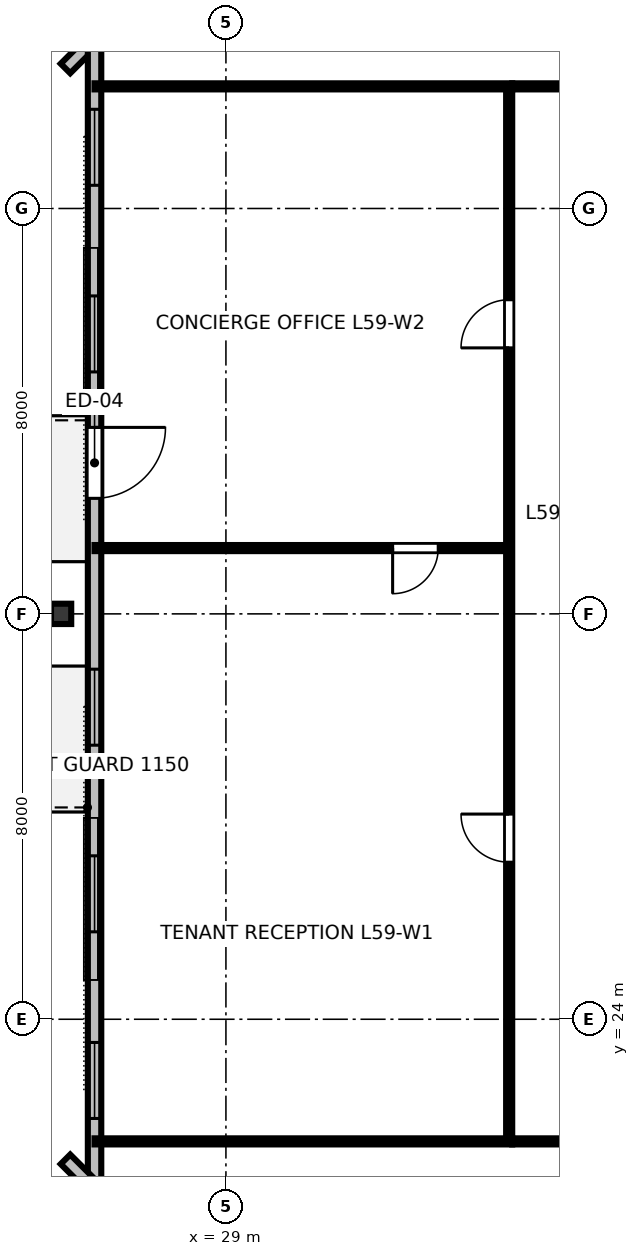
"""IFC4 building model, lengths in metres.
Left out: names, types, materials, properties, quantities, classifications, styles, units other than length and angle.
Written with IfcOpenShell. Run it as: python <this file> out.ifc"""

import sys

from ifc_helpers import new_model, si_unit, direction, frame, frame_2d, origin, origin_2d, place, context, subcontext, project, spatial, rectangle, i_section, extrude, element, fill, save


model = new_model("IFC4")
c1 = context("Model", 3, precision=1e-05, world=origin(), true_north=direction((0.0, 1.0)))
c2 = subcontext(c1, "Body", "Model", "MODEL_VIEW")
j1 = project(units=[si_unit("LENGTHUNIT", "METRE"), si_unit("PLANEANGLEUNIT", "RADIAN")], contexts=[c1])
p1 = place(None, origin())
s1 = spatial("IfcSite", under=j1, at=p1, CompositionType="ELEMENT")
p2 = place(p1, origin())
s2 = spatial("IfcBuilding", under=s1, at=p2, CompositionType="ELEMENT")
p3 = place(p2, frame((0.0, 0.0, 223.8)))
s3 = spatial("IfcBuildingStorey", under=s2, at=p3, CompositionType="ELEMENT", Elevation=223.8)
p4 = place(p3, frame((25.747, 32.0, 0.0), z_axis=(0.0, 0.0, 1.0), x_axis=(0.0, 1.0, 0.0)))
e1 = element("IfcColumn", 1, at=p4, inside=s3, PredefinedType="COLUMN", context=c2, shape_type="SweptSolid", body=[
    extrude(i_section(OverallWidth=0.401, OverallDepth=0.399, WebThickness=0.025, FlangeThickness=0.04, FilletRadius=0.025, at=origin_2d()), origin(), (0.0, 0.0, 1.0), 3.373),
])
p5 = place(p3, frame((33.191, 50.121, 0.0), z_axis=(0.0, 0.0, 1.0), x_axis=(-0.707106781187, -0.707106781187, 0.0)))
e2 = element("IfcWall", 2, at=p5, inside=s3, PredefinedType="STANDARD", context=c2, shape_type="SweptSolid", body=[
    extrude(rectangle(XDim=10.405, YDim=0.265, at=frame_2d((5.203, 0.0))), origin(), (0.0, 0.0, 1.0), 3.375),
])
p6 = place(p3, frame((26.407, 44.149, 0.0), z_axis=(0.0, 0.0, 1.0), x_axis=(0.0, -1.0, 0.0)))
e3 = element("IfcWall", 3, at=p6, inside=s3, PredefinedType="STANDARD", context=c2, shape_type="SweptSolid", body=[
    extrude(rectangle(XDim=24.298, YDim=0.265, at=frame_2d((12.149, 0.0))), origin(), (0.0, 0.0, 1.0), 3.375),
])
p7 = place(p6, frame((8.469, 0.0, 0.0)))
e4 = element("IfcOpeningElement", 4, at=p7, cuts=e3, PredefinedType="OPENING", context=c2, shape_type="SweptSolid", body=[
    extrude(rectangle(XDim=1.4, YDim=2.15, at=frame_2d((0.7, 1.075))), frame((0.0, 0.142, 0.0), z_axis=(0.0, -1.0, 0.0), x_axis=(1.0, 0.0, 0.0)), (0.0, 0.0, 1.0), 0.285),
])
p8 = place(p6, frame((2.191, 0.0, 0.85)))
e5 = element("IfcOpeningElement", 5, at=p8, cuts=e3, PredefinedType="OPENING", context=c2, shape_type="SweptSolid", body=[
    extrude(rectangle(XDim=1.5, YDim=1.85, at=frame_2d((0.75, 0.925))), frame((0.0, 0.142, 0.0), z_axis=(0.0, -1.0, 0.0), x_axis=(1.0, 0.0, 0.0)), (0.0, 0.0, 1.0), 0.285),
])
p9 = place(p6, frame((5.875, 0.0, 0.85)))
e6 = element("IfcOpeningElement", 6, at=p9, cuts=e3, PredefinedType="OPENING", context=c2, shape_type="SweptSolid", body=[
    extrude(rectangle(XDim=1.5, YDim=1.85, at=frame_2d((0.75, 0.925))), frame((0.0, 0.142, 0.0), z_axis=(0.0, -1.0, 0.0), x_axis=(1.0, 0.0, 0.0)), (0.0, 0.0, 1.0), 0.285),
])
p10 = place(p6, frame((13.24, 0.0, 0.85)))
e7 = element("IfcOpeningElement", 7, at=p10, cuts=e3, PredefinedType="OPENING", context=c2, shape_type="SweptSolid", body=[
    extrude(rectangle(XDim=1.5, YDim=1.85, at=frame_2d((0.75, 0.925))), frame((0.0, 0.142, 0.0), z_axis=(0.0, -1.0, 0.0), x_axis=(1.0, 0.0, 0.0)), (0.0, 0.0, 1.0), 0.285),
])
p11 = place(p6, frame((16.924, 0.0, 0.85)))
e8 = element("IfcOpeningElement", 8, at=p11, cuts=e3, PredefinedType="OPENING", context=c2, shape_type="SweptSolid", body=[
    extrude(rectangle(XDim=1.5, YDim=1.85, at=frame_2d((0.75, 0.925))), frame((0.0, 0.142, 0.0), z_axis=(0.0, -1.0, 0.0), x_axis=(1.0, 0.0, 0.0)), (0.0, 0.0, 1.0), 0.285),
])
p12 = place(p6, frame((20.607, 0.0, 0.85)))
e9 = element("IfcOpeningElement", 9, at=p12, cuts=e3, PredefinedType="OPENING", context=c2, shape_type="SweptSolid", body=[
    extrude(rectangle(XDim=1.5, YDim=1.85, at=frame_2d((0.75, 0.925))), frame((0.0, 0.142, 0.0), z_axis=(0.0, -1.0, 0.0), x_axis=(1.0, 0.0, 0.0)), (0.0, 0.0, 1.0), 0.285),
])
p13 = place(p3, frame((25.833, 21.236, 0.0), z_axis=(0.0, 0.0, 1.0), x_axis=(0.707106781187, -0.707106781187, 0.0)))
e10 = element("IfcWall", 10, at=p13, inside=s3, PredefinedType="STANDARD", context=c2, shape_type="SweptSolid", body=[
    extrude(rectangle(XDim=10.405, YDim=0.265, at=frame_2d((5.203, 0.0))), origin(), (0.0, 0.0, 1.0), 3.375),
])
p14 = place(p3, frame((34.65, 21.59, 0.0), z_axis=(0.0, 0.0, 1.0), x_axis=(1.0, 0.0, 0.0)))
e11 = element("IfcWall", 11, at=p14, inside=s3, PredefinedType="PARTITIONING", context=c2, shape_type="SweptSolid", body=[
    extrude(rectangle(XDim=10.33, YDim=0.12, at=frame_2d((5.165, 0.0))), origin(), (0.0, 0.0, 1.0), 2.655),
])
p15 = place(p14, frame((2.762, 0.0, 0.0)))
e12 = element("IfcOpeningElement", 12, at=p15, cuts=e11, PredefinedType="OPENING", context=c2, shape_type="SweptSolid", body=[
    extrude(rectangle(XDim=0.95, YDim=2.15, at=frame_2d((0.475, 1.075))), frame((0.0, 0.07, 0.0), z_axis=(0.0, -1.0, 0.0), x_axis=(1.0, 0.0, 0.0)), (0.0, 0.0, 1.0), 0.14),
])
p16 = place(p14, frame((7.857, 0.0, 0.0)))
e13 = element("IfcOpeningElement", 13, at=p16, cuts=e11, PredefinedType="OPENING", context=c2, shape_type="SweptSolid", body=[
    extrude(rectangle(XDim=0.95, YDim=2.15, at=frame_2d((0.475, 1.075))), frame((0.0, 0.07, 0.0), z_axis=(0.0, -1.0, 0.0), x_axis=(1.0, 0.0, 0.0)), (0.0, 0.0, 1.0), 0.14),
])
p17 = place(p3, frame((34.65, 42.41, 0.0), z_axis=(0.0, 0.0, 1.0), x_axis=(1.0, 0.0, 0.0)))
e14 = element("IfcWall", 14, at=p17, inside=s3, PredefinedType="PARTITIONING", context=c2, shape_type="SweptSolid", body=[
    extrude(rectangle(XDim=10.33, YDim=0.12, at=frame_2d((5.165, 0.0))), origin(), (0.0, 0.0, 1.0), 2.655),
])
p18 = place(p17, frame((2.878, 0.0, 0.0)))
e15 = element("IfcOpeningElement", 15, at=p18, cuts=e14, PredefinedType="OPENING", context=c2, shape_type="SweptSolid", body=[
    extrude(rectangle(XDim=0.95, YDim=2.15, at=frame_2d((0.475, 1.075))), frame((0.0, 0.07, 0.0), z_axis=(0.0, -1.0, 0.0), x_axis=(1.0, 0.0, 0.0)), (0.0, 0.0, 1.0), 0.14),
])
p19 = place(p17, frame((7.974, 0.0, 0.0)))
e16 = element("IfcOpeningElement", 16, at=p19, cuts=e14, PredefinedType="OPENING", context=c2, shape_type="SweptSolid", body=[
    extrude(rectangle(XDim=0.95, YDim=2.15, at=frame_2d((0.475, 1.075))), frame((0.0, 0.07, 0.0), z_axis=(0.0, -1.0, 0.0), x_axis=(1.0, 0.0, 0.0)), (0.0, 0.0, 1.0), 0.14),
])
p20 = place(p3, frame((34.59, 33.299, 0.0), z_axis=(0.0, 0.0, 1.0), x_axis=(-1.0, 0.0, 0.0)))
e17 = element("IfcWall", 17, at=p20, inside=s3, PredefinedType="PARTITIONING", context=c2, shape_type="SweptSolid", body=[
    extrude(rectangle(XDim=8.183, YDim=0.12, at=frame_2d((4.091, 0.0))), origin(), (0.0, 0.0, 1.0), 2.655),
])
p21 = place(p20, frame((1.4, 0.0, 0.0)))
e18 = element("IfcOpeningElement", 18, at=p21, cuts=e17, PredefinedType="OPENING", context=c2, shape_type="SweptSolid", body=[
    extrude(rectangle(XDim=0.9, YDim=2.15, at=frame_2d((0.45, 1.075))), frame((0.0, 0.07, 0.0), z_axis=(0.0, -1.0, 0.0), x_axis=(1.0, 0.0, 0.0)), (0.0, 0.0, 1.0), 0.14),
])
p22 = place(p3, frame((34.59, 21.65, 0.0), z_axis=(0.0, 0.0, 1.0), x_axis=(0.0, 1.0, 0.0)))
e19 = element("IfcWall", 19, at=p22, inside=s3, PredefinedType="PARTITIONING", context=c2, shape_type="SweptSolid", body=[
    extrude(rectangle(XDim=20.7, YDim=0.12, at=frame_2d((10.35, 0.0))), origin(), (0.0, 0.0, 1.0), 2.655),
])
p23 = place(p22, frame((5.449, 0.0, 0.0)))
e20 = element("IfcOpeningElement", 20, at=p23, cuts=e19, PredefinedType="OPENING", context=c2, shape_type="SweptSolid", body=[
    extrude(rectangle(XDim=0.95, YDim=2.15, at=frame_2d((0.475, 1.075))), frame((0.0, 0.07, 0.0), z_axis=(0.0, -1.0, 0.0), x_axis=(1.0, 0.0, 0.0)), (0.0, 0.0, 1.0), 0.14),
])
p24 = place(p22, frame((15.599, 0.0, 0.0)))
e21 = element("IfcOpeningElement", 21, at=p24, cuts=e19, PredefinedType="OPENING", context=c2, shape_type="SweptSolid", body=[
    extrude(rectangle(XDim=0.95, YDim=2.15, at=frame_2d((0.475, 1.075))), frame((0.0, 0.07, 0.0), z_axis=(0.0, -1.0, 0.0), x_axis=(1.0, 0.0, 0.0)), (0.0, 0.0, 1.0), 0.14),
])
for number, where, z_axis, x_axis in (
    (22, (34.65, 21.59, 0.0), (0.0, 0.0, 1.0), (-1.0, 0.0, 0.0)),
    (23, (34.65, 42.41, 0.0), (0.0, 0.0, 1.0), (-1.0, 0.0, 0.0)),
):
    element("IfcWall", number, at=place(p3, frame(where, z_axis=z_axis, x_axis=x_axis)), inside=s3, PredefinedType="PARTITIONING", context=c2, shape_type="SweptSolid", body=[
        extrude(rectangle(XDim=8.243, YDim=0.12, at=frame_2d((4.121, 0.0))), origin(), (0.0, 0.0, 1.0), 2.655),
    ])
p25 = place(p7, origin())
e24 = element("IfcDoor", 24, at=p25, inside=s3, OperationType="SINGLE_SWING_LEFT", PredefinedType="DOOR", context=c2, shape_type="SweptSolid", body=[
    extrude(rectangle(XDim=1.4, YDim=2.15, at=frame_2d((0.7, 1.075))), frame((0.0, 0.025, 0.0), z_axis=(0.0, -1.0, 0.0), x_axis=(1.0, 0.0, 0.0)), (0.0, 0.0, 1.0), 0.05),
])
fill(e4, e24)
p26 = place(p8, origin())
e25 = element("IfcWindow", 25, at=p26, inside=s3, PartitioningType="SINGLE_PANEL", PredefinedType="WINDOW", context=c2, shape_type="SweptSolid", body=[
    extrude(rectangle(XDim=1.5, YDim=1.85, at=frame_2d((0.75, 0.925))), frame((0.0, 0.03, 0.0), z_axis=(0.0, -1.0, 0.0), x_axis=(1.0, 0.0, 0.0)), (0.0, 0.0, 1.0), 0.06),
])
fill(e5, e25)
p27 = place(p9, origin())
e26 = element("IfcWindow", 26, at=p27, inside=s3, PartitioningType="SINGLE_PANEL", PredefinedType="WINDOW", context=c2, shape_type="SweptSolid", body=[
    extrude(rectangle(XDim=1.5, YDim=1.85, at=frame_2d((0.75, 0.925))), frame((0.0, 0.03, 0.0), z_axis=(0.0, -1.0, 0.0), x_axis=(1.0, 0.0, 0.0)), (0.0, 0.0, 1.0), 0.06),
])
fill(e6, e26)
p28 = place(p10, origin())
e27 = element("IfcWindow", 27, at=p28, inside=s3, PartitioningType="SINGLE_PANEL", PredefinedType="WINDOW", context=c2, shape_type="SweptSolid", body=[
    extrude(rectangle(XDim=1.5, YDim=1.85, at=frame_2d((0.75, 0.925))), frame((0.0, 0.03, 0.0), z_axis=(0.0, -1.0, 0.0), x_axis=(1.0, 0.0, 0.0)), (0.0, 0.0, 1.0), 0.06),
])
fill(e7, e27)
p29 = place(p11, origin())
e28 = element("IfcWindow", 28, at=p29, inside=s3, PartitioningType="SINGLE_PANEL", PredefinedType="WINDOW", context=c2, shape_type="SweptSolid", body=[
    extrude(rectangle(XDim=1.5, YDim=1.85, at=frame_2d((0.75, 0.925))), frame((0.0, 0.03, 0.0), z_axis=(0.0, -1.0, 0.0), x_axis=(1.0, 0.0, 0.0)), (0.0, 0.0, 1.0), 0.06),
])
fill(e8, e28)
p30 = place(p12, origin())
e29 = element("IfcWindow", 29, at=p30, inside=s3, PartitioningType="SINGLE_PANEL", PredefinedType="WINDOW", context=c2, shape_type="SweptSolid", body=[
    extrude(rectangle(XDim=1.5, YDim=1.85, at=frame_2d((0.75, 0.925))), frame((0.0, 0.03, 0.0), z_axis=(0.0, -1.0, 0.0), x_axis=(1.0, 0.0, 0.0)), (0.0, 0.0, 1.0), 0.06),
])
fill(e9, e29)
p31 = place(p21, origin())
e30 = element("IfcDoor", 30, at=p31, inside=s3, OperationType="SINGLE_SWING_RIGHT", PredefinedType="DOOR", context=c2, shape_type="SweptSolid", body=[
    extrude(rectangle(XDim=0.9, YDim=2.15, at=frame_2d((0.45, 1.075))), frame((0.0, 0.025, 0.0), z_axis=(0.0, -1.0, 0.0), x_axis=(1.0, 0.0, 0.0)), (0.0, 0.0, 1.0), 0.05),
])
fill(e18, e30)
p32 = place(p23, origin())
e31 = element("IfcDoor", 31, at=p32, inside=s3, OperationType="SINGLE_SWING_RIGHT", PredefinedType="DOOR", context=c2, shape_type="SweptSolid", body=[
    extrude(rectangle(XDim=0.95, YDim=2.15, at=frame_2d((0.475, 1.075))), frame((0.0, 0.025, 0.0), z_axis=(0.0, -1.0, 0.0), x_axis=(1.0, 0.0, 0.0)), (0.0, 0.0, 1.0), 0.05),
])
fill(e20, e31)
p33 = place(p24, origin())
e32 = element("IfcDoor", 32, at=p33, inside=s3, OperationType="SINGLE_SWING_LEFT", PredefinedType="DOOR", context=c2, shape_type="SweptSolid", body=[
    extrude(rectangle(XDim=0.95, YDim=2.15, at=frame_2d((0.475, 1.075))), frame((0.0, 0.025, 0.0), z_axis=(0.0, -1.0, 0.0), x_axis=(1.0, 0.0, 0.0)), (0.0, 0.0, 1.0), 0.05),
])
fill(e21, e32)
save(model, sys.argv[1])
